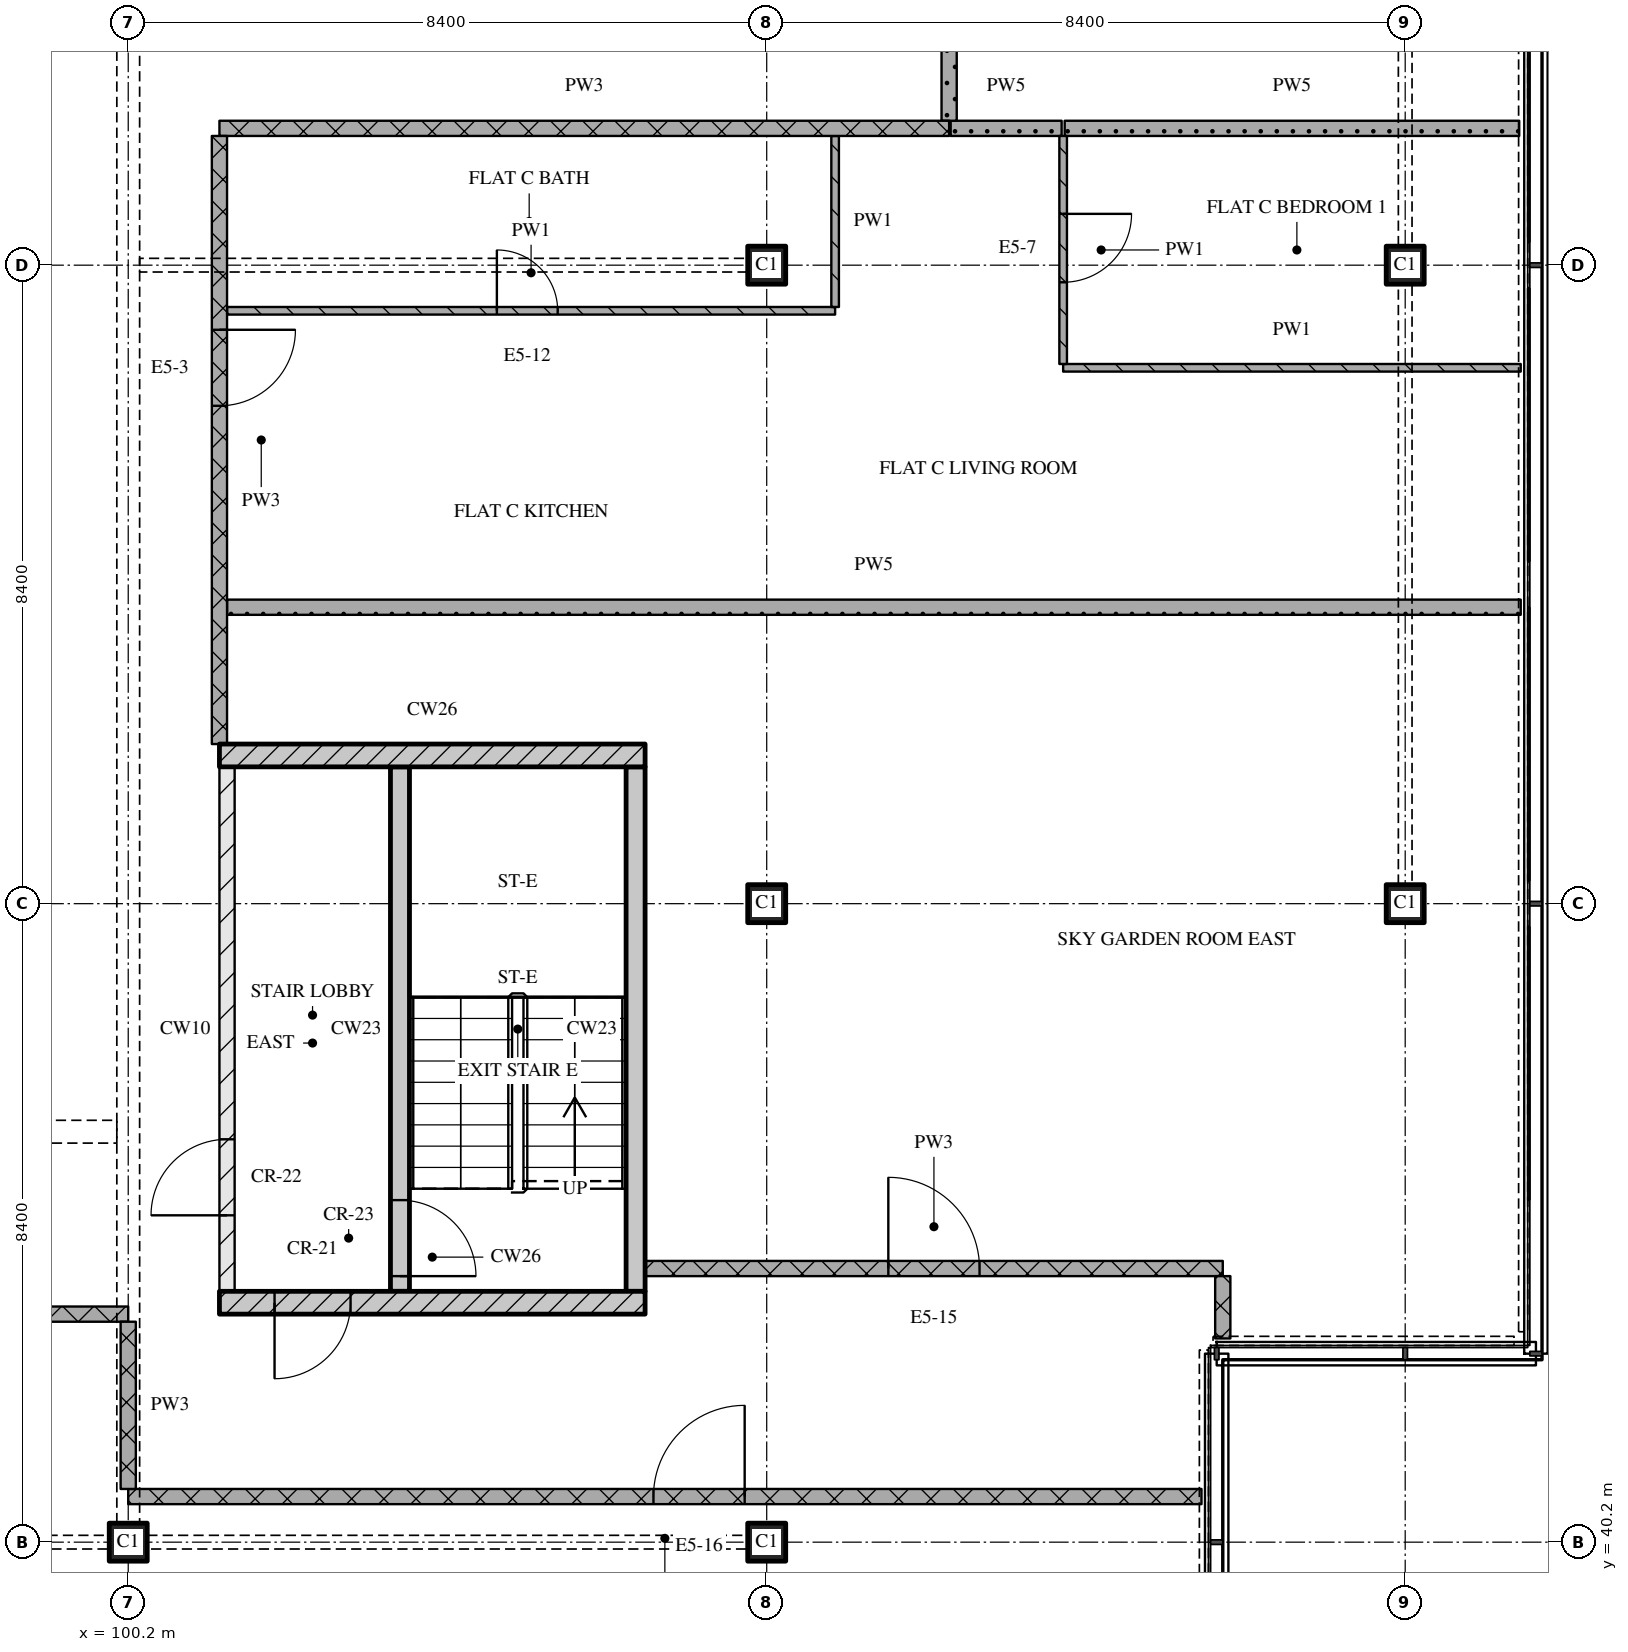
"""IFC4 building model, lengths in metres.
Left out: names, types, materials, properties, quantities, classifications, styles, units other than length and angle.
Written with IfcOpenShell. Run it as: python <this file> out.ifc"""

import sys

from ifc_helpers import new_model, si_unit, direction, frame, frame_2d, origin, origin_2d, place, context, subcontext, project, spatial, rectangle, extrude, element, fill, save


model = new_model("IFC4")
c1 = context("Model", 3, precision=1e-05, world=origin(), true_north=direction((0.0, 1.0)))
c2 = subcontext(c1, "Body", "Model", "MODEL_VIEW")
j1 = project(units=[si_unit("LENGTHUNIT", "METRE"), si_unit("PLANEANGLEUNIT", "RADIAN")], contexts=[c1])
p1 = place(None, origin())
s1 = spatial("IfcSite", under=j1, at=p1, CompositionType="ELEMENT")
p2 = place(p1, origin())
s2 = spatial("IfcBuilding", under=s1, at=p2, CompositionType="ELEMENT")
p3 = place(p2, frame((0.0, 0.0, 295.95)))
s3 = spatial("IfcBuildingStorey", under=s2, at=p3, CompositionType="ELEMENT", Elevation=295.95)
for number, where, z_axis, x_axis in (
    (1, (100.2, 40.2, 0.0), (0.0, 0.0, 1.0), (1.0, 0.0, 0.0)),
    (2, (108.6, 40.2, 0.0), (0.0, 0.0, 1.0), (1.0, 0.0, 0.0)),
    (3, (108.6, 48.6, 0.0), (0.0, 0.0, 1.0), (1.0, 0.0, 0.0)),
    (4, (108.6, 57.0, 0.0), (0.0, 0.0, 1.0), (1.0, 0.0, 0.0)),
    (5, (117.0, 48.6, 0.0), (0.0, 0.0, 1.0), (1.0, 0.0, 0.0)),
    (6, (117.0, 57.0, 0.0), (0.0, 0.0, 1.0), (1.0, 0.0, 0.0)),
):
    element("IfcColumn", number, at=place(p3, frame(where, z_axis=z_axis, x_axis=x_axis)), inside=s3, PredefinedType="COLUMN", context=c2, shape_type="SweptSolid", body=[
        extrude(rectangle(XDim=0.5, YDim=0.5, at=origin_2d()), origin(), (0.0, 0.0, 1.0), 3.6),
    ])
p4 = place(p3, frame((101.4, 43.35, 0.0), z_axis=(0.0, 0.0, 1.0), x_axis=(1.0, 0.0, 0.0)))
e7 = element("IfcWall", 7, at=p4, inside=s3, PredefinedType="SOLIDWALL", context=c2, shape_type="SweptSolid", body=[
    extrude(rectangle(XDim=5.6, YDim=0.3, at=frame_2d((2.8, 0.0))), origin(), (0.0, 0.0, 1.0), 3.32),
])
p5 = place(p4, frame((0.725, 0.0, 0.0)))
e8 = element("IfcOpeningElement", 8, at=p5, cuts=e7, PredefinedType="OPENING", context=c2, shape_type="SweptSolid", body=[
    extrude(rectangle(XDim=1.0, YDim=2.1, at=frame_2d((0.5, 1.05))), frame((0.0, 0.16, 0.0), z_axis=(0.0, -1.0, 0.0), x_axis=(1.0, 0.0, 0.0)), (0.0, 0.0, 1.0), 0.32),
])
p6 = place(p3, frame((101.5, 43.5, 0.0), z_axis=(0.0, 0.0, 1.0), x_axis=(0.0, 1.0, 0.0)))
e9 = element("IfcWall", 9, at=p6, inside=s3, PredefinedType="PARTITIONING", context=c2, shape_type="SweptSolid", body=[
    extrude(rectangle(XDim=6.9, YDim=0.2, at=frame_2d((3.45, 0.0))), origin(), (0.0, 0.0, 1.0), 3.32),
])
p7 = place(p6, frame((1.0, 0.0, 0.0)))
e10 = element("IfcOpeningElement", 10, at=p7, cuts=e9, PredefinedType="OPENING", context=c2, shape_type="SweptSolid", body=[
    extrude(rectangle(XDim=1.0, YDim=2.1, at=frame_2d((0.5, 1.05))), frame((0.0, 0.11, 0.0), z_axis=(0.0, -1.0, 0.0), x_axis=(1.0, 0.0, 0.0)), (0.0, 0.0, 1.0), 0.22),
])
p8 = place(p3, frame((103.775, 43.5, 0.0), z_axis=(0.0, 0.0, 1.0), x_axis=(0.0, 1.0, 0.0)))
e11 = element("IfcWall", 11, at=p8, inside=s3, PredefinedType="SOLIDWALL", context=c2, shape_type="SweptSolid", body=[
    extrude(rectangle(XDim=6.9, YDim=0.25, at=frame_2d((3.45, 0.0))), origin(), (0.0, 0.0, 1.0), 3.32),
])
p9 = place(p8, frame((0.2, 0.0, 0.0)))
e12 = element("IfcOpeningElement", 12, at=p9, cuts=e11, PredefinedType="OPENING", context=c2, shape_type="SweptSolid", body=[
    extrude(rectangle(XDim=1.0, YDim=2.1, at=frame_2d((0.5, 1.05))), frame((0.0, 0.135, 0.0), z_axis=(0.0, -1.0, 0.0), x_axis=(1.0, 0.0, 0.0)), (0.0, 0.0, 1.0), 0.27),
])
p10 = place(p3, frame((106.875, 43.5, 0.0), z_axis=(0.0, 0.0, 1.0), x_axis=(0.0, 1.0, 0.0)))
e13 = element("IfcWall", 13, at=p10, inside=s3, PredefinedType="SOLIDWALL", context=c2, shape_type="SweptSolid", body=[
    extrude(rectangle(XDim=6.9, YDim=0.25, at=frame_2d((3.45, 0.0))), origin(), (0.0, 0.0, 1.0), 3.32),
])
p11 = place(p3, frame((101.4, 50.55, 0.0), z_axis=(0.0, 0.0, 1.0), x_axis=(1.0, 0.0, 0.0)))
e14 = element("IfcWall", 14, at=p11, inside=s3, PredefinedType="SOLIDWALL", context=c2, shape_type="SweptSolid", body=[
    extrude(rectangle(XDim=5.6, YDim=0.3, at=frame_2d((2.8, 0.0))), origin(), (0.0, 0.0, 1.0), 3.32),
])
p12 = place(p3, frame((114.32, 40.8, 0.0), z_axis=(0.0, 0.0, 1.0), x_axis=(-1.0, 0.0, 0.0)))
e15 = element("IfcWall", 15, at=p12, inside=s3, PredefinedType="PARTITIONING", context=c2, shape_type="SweptSolid", body=[
    extrude(rectangle(XDim=14.12, YDim=0.2, at=frame_2d((7.06, 0.0))), origin(), (0.0, 0.0, 1.0), 3.32),
])
p13 = place(p12, frame((6.01, 0.0, 0.0)))
e16 = element("IfcOpeningElement", 16, at=p13, cuts=e15, PredefinedType="OPENING", context=c2, shape_type="SweptSolid", body=[
    extrude(rectangle(XDim=1.2, YDim=2.1, at=frame_2d((0.6, 1.05))), frame((0.0, 0.11, 0.0), z_axis=(0.0, -1.0, 0.0), x_axis=(1.0, 0.0, 0.0)), (0.0, 0.0, 1.0), 0.22),
])
p14 = place(p3, frame((100.2, 43.2, 0.0), z_axis=(0.0, 0.0, 1.0), x_axis=(-1.0, 0.0, 0.0)))
e17 = element("IfcWall", 17, at=p14, inside=s3, PredefinedType="PARTITIONING", context=c2, shape_type="SweptSolid", body=[
    extrude(rectangle(XDim=25.2, YDim=0.2, at=frame_2d((12.6, 0.0))), origin(), (0.0, 0.0, 1.0), 3.32),
])
p15 = place(p14, frame((12.0, 0.0, 0.0)))
e18 = element("IfcOpeningElement", 18, at=p15, cuts=e17, PredefinedType="OPENING", context=c2, shape_type="SweptSolid", body=[
    extrude(rectangle(XDim=1.2, YDim=2.1, at=frame_2d((0.6, 1.05))), frame((0.0, 0.11, 0.0), z_axis=(0.0, -1.0, 0.0), x_axis=(1.0, 0.0, 0.0)), (0.0, 0.0, 1.0), 0.22),
])
p16 = place(p3, frame((107.0, 43.8, 0.0), z_axis=(0.0, 0.0, 1.0), x_axis=(1.0, 0.0, 0.0)))
e19 = element("IfcWall", 19, at=p16, inside=s3, PredefinedType="PARTITIONING", context=c2, shape_type="SweptSolid", body=[
    extrude(rectangle(XDim=7.6, YDim=0.2, at=frame_2d((3.8, 0.0))), origin(), (0.0, 0.0, 1.0), 3.32),
])
p17 = place(p16, frame((3.2, 0.0, 0.0)))
e20 = element("IfcOpeningElement", 20, at=p17, cuts=e19, PredefinedType="OPENING", context=c2, shape_type="SweptSolid", body=[
    extrude(rectangle(XDim=1.2, YDim=2.1, at=frame_2d((0.6, 1.05))), frame((0.0, 0.11, 0.0), z_axis=(0.0, -1.0, 0.0), x_axis=(1.0, 0.0, 0.0)), (0.0, 0.0, 1.0), 0.22),
])
p18 = place(p3, frame((101.5, 52.5, 0.0), z_axis=(0.0, 0.0, 1.0), x_axis=(1.0, 0.0, 0.0)))
e21 = element("IfcWall", 21, at=p18, inside=s3, PredefinedType="PARTITIONING", context=c2, shape_type="SweptSolid", body=[
    extrude(rectangle(XDim=17.02, YDim=0.2, at=frame_2d((8.51, 0.0))), origin(), (0.0, 0.0, 1.0), 3.32),
])
p19 = place(p3, frame((112.5, 55.65, 0.0), z_axis=(0.0, 0.0, 1.0), x_axis=(1.0, 0.0, 0.0)))
e22 = element("IfcWall", 22, at=p19, inside=s3, PredefinedType="PARTITIONING", context=c2, shape_type="SweptSolid", body=[
    extrude(rectangle(XDim=6.02, YDim=0.1, at=frame_2d((3.01, 0.0))), origin(), (0.0, 0.0, 1.0), 3.32),
])
p20 = place(p3, frame((101.5, 56.4, 0.0), z_axis=(0.0, 0.0, 1.0), x_axis=(1.0, 0.0, 0.0)))
e23 = element("IfcWall", 23, at=p20, inside=s3, PredefinedType="PARTITIONING", context=c2, shape_type="SweptSolid", body=[
    extrude(rectangle(XDim=8.0, YDim=0.1, at=frame_2d((4.0, 0.0))), origin(), (0.0, 0.0, 1.0), 3.32),
])
p21 = place(p20, frame((3.55, 0.0, 0.0)))
e24 = element("IfcOpeningElement", 24, at=p21, cuts=e23, PredefinedType="OPENING", context=c2, shape_type="SweptSolid", body=[
    extrude(rectangle(XDim=0.8, YDim=2.1, at=frame_2d((0.4, 1.05))), frame((0.0, 0.06, 0.0), z_axis=(0.0, -1.0, 0.0), x_axis=(1.0, 0.0, 0.0)), (0.0, 0.0, 1.0), 0.12),
])
p22 = place(p3, frame((101.4, 58.8, 0.0), z_axis=(0.0, 0.0, 1.0), x_axis=(1.0, 0.0, 0.0)))
e25 = element("IfcWall", 25, at=p22, inside=s3, PredefinedType="PARTITIONING", context=c2, shape_type="SweptSolid", body=[
    extrude(rectangle(XDim=9.6, YDim=0.2, at=frame_2d((4.8, 0.0))), origin(), (0.0, 0.0, 1.0), 3.32),
])
p23 = place(p3, frame((111.02, 58.8, 0.0), z_axis=(0.0, 0.0, 1.0), x_axis=(1.0, 0.0, 0.0)))
e26 = element("IfcWall", 26, at=p23, inside=s3, PredefinedType="PARTITIONING", context=c2, shape_type="SweptSolid", body=[
    extrude(rectangle(XDim=1.46, YDim=0.2, at=frame_2d((0.73, 0.0))), origin(), (0.0, 0.0, 1.0), 3.32),
])
p24 = place(p3, frame((112.52, 58.8, 0.0), z_axis=(0.0, 0.0, 1.0), x_axis=(1.0, 0.0, 0.0)))
e27 = element("IfcWall", 27, at=p24, inside=s3, PredefinedType="PARTITIONING", context=c2, shape_type="SweptSolid", body=[
    extrude(rectangle(XDim=5.98, YDim=0.2, at=frame_2d((2.99, 0.0))), origin(), (0.0, 0.0, 1.0), 3.32),
])
p25 = place(p3, frame((100.2, 43.1, 0.0), z_axis=(0.0, 0.0, 1.0), x_axis=(0.0, -1.0, 0.0)))
e28 = element("IfcWall", 28, at=p25, inside=s3, PredefinedType="PARTITIONING", context=c2, shape_type="SweptSolid", body=[
    extrude(rectangle(XDim=2.2, YDim=0.2, at=frame_2d((1.1, 0.0))), origin(), (0.0, 0.0, 1.0), 2.53),
])
p26 = place(p3, frame((101.4, 58.7, 0.0), z_axis=(0.0, 0.0, 1.0), x_axis=(0.0, -1.0, 0.0)))
e29 = element("IfcWall", 29, at=p26, inside=s3, PredefinedType="PARTITIONING", context=c2, shape_type="SweptSolid", body=[
    extrude(rectangle(XDim=8.0, YDim=0.2, at=frame_2d((4.0, 0.0))), origin(), (0.0, 0.0, 1.0), 3.32),
])
p27 = place(p26, frame((2.55, 0.0, 0.0)))
e30 = element("IfcOpeningElement", 30, at=p27, cuts=e29, PredefinedType="OPENING", context=c2, shape_type="SweptSolid", body=[
    extrude(rectangle(XDim=1.0, YDim=2.1, at=frame_2d((0.5, 1.05))), frame((0.0, 0.11, 0.0), z_axis=(0.0, -1.0, 0.0), x_axis=(1.0, 0.0, 0.0)), (0.0, 0.0, 1.0), 0.22),
])
p28 = place(p3, frame((109.5, 58.7, 0.0), z_axis=(0.0, 0.0, 1.0), x_axis=(0.0, -1.0, 0.0)))
e31 = element("IfcWall", 31, at=p28, inside=s3, PredefinedType="PARTITIONING", context=c2, shape_type="SweptSolid", body=[
    extrude(rectangle(XDim=2.25, YDim=0.1, at=frame_2d((1.125, 0.0))), origin(), (0.0, 0.0, 1.0), 3.32),
])
p29 = place(p3, frame((111.0, 61.1, 0.0), z_axis=(0.0, 0.0, 1.0), x_axis=(0.0, -1.0, 0.0)))
e32 = element("IfcWall", 32, at=p29, inside=s3, PredefinedType="PARTITIONING", context=c2, shape_type="SweptSolid", body=[
    extrude(rectangle(XDim=2.2, YDim=0.2, at=frame_2d((1.1, 0.0))), origin(), (0.0, 0.0, 1.0), 3.32),
])
p30 = place(p3, frame((112.5, 58.7, 0.0), z_axis=(0.0, 0.0, 1.0), x_axis=(0.0, -1.0, 0.0)))
e33 = element("IfcWall", 33, at=p30, inside=s3, PredefinedType="PARTITIONING", context=c2, shape_type="SweptSolid", body=[
    extrude(rectangle(XDim=3.0, YDim=0.1, at=frame_2d((1.5, 0.0))), origin(), (0.0, 0.0, 1.0), 3.32),
])
p31 = place(p30, frame((1.025, 0.0, 0.0)))
e34 = element("IfcOpeningElement", 34, at=p31, cuts=e33, PredefinedType="OPENING", context=c2, shape_type="SweptSolid", body=[
    extrude(rectangle(XDim=0.9, YDim=2.1, at=frame_2d((0.45, 1.05))), frame((0.0, 0.06, 0.0), z_axis=(0.0, -1.0, 0.0), x_axis=(1.0, 0.0, 0.0)), (0.0, 0.0, 1.0), 0.12),
])
p32 = place(p3, frame((114.6, 43.7, 0.0), z_axis=(0.0, 0.0, 1.0), x_axis=(0.0, -1.0, 0.0)))
e35 = element("IfcWall", 35, at=p32, inside=s3, PredefinedType="PARTITIONING", context=c2, shape_type="SweptSolid", body=[
    extrude(rectangle(XDim=0.82, YDim=0.2, at=frame_2d((0.41, 0.0))), origin(), (0.0, 0.0, 1.0), 3.32),
])
p33 = place(p5, origin())
e36 = element("IfcDoor", 36, at=p33, inside=s3, OperationType="SINGLE_SWING_RIGHT", PredefinedType="DOOR", context=c2, shape_type="SweptSolid", body=[
    extrude(rectangle(XDim=1.0, YDim=2.1, at=frame_2d((0.5, 1.05))), frame((0.0, 0.025, 0.0), z_axis=(0.0, -1.0, 0.0), x_axis=(1.0, 0.0, 0.0)), (0.0, 0.0, 1.0), 0.05),
])
fill(e8, e36)
p34 = place(p9, origin())
e37 = element("IfcDoor", 37, at=p34, inside=s3, OperationType="SINGLE_SWING_RIGHT", PredefinedType="DOOR", context=c2, shape_type="SweptSolid", body=[
    extrude(rectangle(XDim=1.0, YDim=2.1, at=frame_2d((0.5, 1.05))), frame((0.0, 0.025, 0.0), z_axis=(0.0, -1.0, 0.0), x_axis=(1.0, 0.0, 0.0)), (0.0, 0.0, 1.0), 0.05),
])
fill(e12, e37)
p35 = place(p7, origin())
e38 = element("IfcDoor", 38, at=p35, inside=s3, OperationType="SINGLE_SWING_LEFT", PredefinedType="DOOR", context=c2, shape_type="SweptSolid", body=[
    extrude(rectangle(XDim=1.0, YDim=2.1, at=frame_2d((0.5, 1.05))), frame((0.0, 0.025, 0.0), z_axis=(0.0, -1.0, 0.0), x_axis=(1.0, 0.0, 0.0)), (0.0, 0.0, 1.0), 0.05),
])
fill(e10, e38)
p36 = place(p13, origin())
e39 = element("IfcDoor", 39, at=p36, inside=s3, OperationType="SINGLE_SWING_RIGHT", PredefinedType="DOOR", context=c2, shape_type="SweptSolid", body=[
    extrude(rectangle(XDim=1.2, YDim=2.1, at=frame_2d((0.6, 1.05))), frame((0.0, 0.025, 0.0), z_axis=(0.0, -1.0, 0.0), x_axis=(1.0, 0.0, 0.0)), (0.0, 0.0, 1.0), 0.05),
])
fill(e16, e39)
p37 = place(p17, origin())
e40 = element("IfcDoor", 40, at=p37, inside=s3, OperationType="SINGLE_SWING_LEFT", PredefinedType="DOOR", context=c2, shape_type="SweptSolid", body=[
    extrude(rectangle(XDim=1.2, YDim=2.1, at=frame_2d((0.6, 1.05))), frame((0.0, 0.025, 0.0), z_axis=(0.0, -1.0, 0.0), x_axis=(1.0, 0.0, 0.0)), (0.0, 0.0, 1.0), 0.05),
])
fill(e20, e40)
p38 = place(p21, origin())
e41 = element("IfcDoor", 41, at=p38, inside=s3, OperationType="SINGLE_SWING_LEFT", PredefinedType="DOOR", context=c2, shape_type="SweptSolid", body=[
    extrude(rectangle(XDim=0.8, YDim=2.1, at=frame_2d((0.4, 1.05))), frame((0.0, 0.025, 0.0), z_axis=(0.0, -1.0, 0.0), x_axis=(1.0, 0.0, 0.0)), (0.0, 0.0, 1.0), 0.05),
])
fill(e24, e41)
p39 = place(p27, origin())
e42 = element("IfcDoor", 42, at=p39, inside=s3, OperationType="SINGLE_SWING_LEFT", PredefinedType="DOOR", context=c2, shape_type="SweptSolid", body=[
    extrude(rectangle(XDim=1.0, YDim=2.1, at=frame_2d((0.5, 1.05))), frame((0.0, 0.025, 0.0), z_axis=(0.0, -1.0, 0.0), x_axis=(1.0, 0.0, 0.0)), (0.0, 0.0, 1.0), 0.05),
])
fill(e30, e42)
p40 = place(p31, origin())
e43 = element("IfcDoor", 43, at=p40, inside=s3, OperationType="SINGLE_SWING_LEFT", PredefinedType="DOOR", context=c2, shape_type="SweptSolid", body=[
    extrude(rectangle(XDim=0.9, YDim=2.1, at=frame_2d((0.45, 1.05))), frame((0.0, 0.025, 0.0), z_axis=(0.0, -1.0, 0.0), x_axis=(1.0, 0.0, 0.0)), (0.0, 0.0, 1.0), 0.05),
])
fill(e34, e43)
save(model, sys.argv[1])
